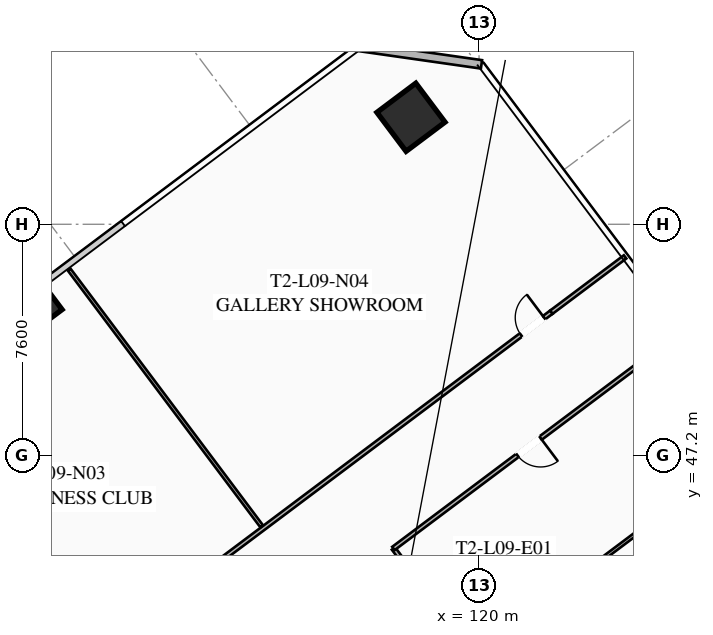
"""IFC4 building model, lengths in metres.
Left out: names, types, materials, properties, quantities, classifications, styles, units other than length and angle.
Written with IfcOpenShell. Run it as: python <this file> out.ifc"""

import sys

from ifc_helpers import new_model, si_unit, direction, frame, frame_2d, origin, origin_2d, place, context, subcontext, project, spatial, rectangle, hollow_rectangle, extrude, element, fill, save


model = new_model("IFC4")
c1 = context("Model", 3, precision=1e-05, world=origin(), true_north=direction((0.0, 1.0)))
c2 = subcontext(c1, "Body", "Model", "MODEL_VIEW")
j1 = project(units=[si_unit("LENGTHUNIT", "METRE"), si_unit("PLANEANGLEUNIT", "RADIAN")], contexts=[c1])
p1 = place(None, origin())
s1 = spatial("IfcSite", under=j1, at=p1, CompositionType="ELEMENT")
p2 = place(p1, origin())
s2 = spatial("IfcBuilding", under=s1, at=p2, CompositionType="ELEMENT")
p3 = place(p2, frame((0.0, 0.0, 38.8)))
s3 = spatial("IfcBuildingStorey", under=s2, at=p3, CompositionType="ELEMENT", Elevation=38.8)
p4 = place(p3, frame((117.76, 58.32, 0.0), z_axis=(0.0, 0.0, 1.0), x_axis=(0.799999996291, 0.600000004945, 0.0)))
e1 = element("IfcColumn", 1, at=p4, inside=s3, PredefinedType="COLUMN", context=c2, shape_type="SweptSolid", body=[
    extrude(hollow_rectangle(XDim=1.6, YDim=1.6, WallThickness=0.06, at=origin_2d()), origin(), (0.0, 0.0, 1.0), 3.35),
])
p5 = place(p3, frame((105.69, 52.08, 0.0), z_axis=(0.0, 0.0, 1.0), x_axis=(0.799999996291, 0.600000004945, 0.0)))
e2 = element("IfcColumn", 2, at=p5, inside=s3, PredefinedType="COLUMN", context=c2, shape_type="SweptSolid", body=[
    extrude(hollow_rectangle(XDim=0.85, YDim=0.85, WallThickness=0.035, at=origin_2d()), origin(), (0.0, 0.0, 1.0), 3.35),
])
p6 = place(p3, frame((116.02, 60.64, 0.0), z_axis=(0.0, 0.0, 1.0), x_axis=(0.989955445613, -0.14137968631, 0.0)))
e3 = element("IfcWall", 3, at=p6, inside=s3, PredefinedType="SOLIDWALL", context=c2, shape_type="SweptSolid", body=[
    extrude(rectangle(XDim=4.101, YDim=0.28, at=frame_2d((2.051, 0.0))), origin(), (0.0, 0.0, 1.0), 3.35),
])
p7 = place(p3, frame((119.824, 40.618, 0.0), z_axis=(0.0, 0.0, 1.0), x_axis=(-0.599982243973, 0.800013316712, 0.0)))
e4 = element("IfcWall", 4, at=p7, inside=s3, PredefinedType="PARTITIONING", context=c2, shape_type="SweptSolid", body=[
    extrude(rectangle(XDim=4.4, YDim=0.135, at=frame_2d((2.2, 0.0))), origin(), (0.0, 0.0, 1.0), 2.703),
])
p8 = place(p3, frame((98.316, 33.862, 0.0), z_axis=(0.0, 0.0, 1.0), x_axis=(0.800001947934, 0.599997402746, 0.0)))
e5 = element("IfcWall", 5, at=p8, inside=s3, PredefinedType="PARTITIONING", context=c2, shape_type="SweptSolid", body=[
    extrude(rectangle(XDim=30.08, YDim=0.135, at=frame_2d((15.04, 0.0))), origin(), (0.0, 0.0, 1.0), 2.703),
])
p9 = place(p8, frame((0.3, 0.0, 0.0)))
e6 = element("IfcOpeningElement", 6, at=p9, cuts=e5, PredefinedType="OPENING", context=c2, shape_type="SweptSolid", body=[
    extrude(rectangle(XDim=0.95, YDim=2.05, at=frame_2d((0.475, 1.025))), frame((0.0, 0.077, 0.0), z_axis=(0.0, -1.0, 0.0), x_axis=(1.0, 0.0, 0.0)), (0.0, 0.0, 1.0), 0.155),
])
p10 = place(p8, frame((7.172, 0.0, 0.0)))
e7 = element("IfcOpeningElement", 7, at=p10, cuts=e5, PredefinedType="OPENING", context=c2, shape_type="SweptSolid", body=[
    extrude(rectangle(XDim=0.95, YDim=2.05, at=frame_2d((0.475, 1.025))), frame((0.0, 0.077, 0.0), z_axis=(0.0, -1.0, 0.0), x_axis=(1.0, 0.0, 0.0)), (0.0, 0.0, 1.0), 0.155),
])
p11 = place(p8, frame((11.218, 0.0, 0.0)))
e8 = element("IfcOpeningElement", 8, at=p11, cuts=e5, PredefinedType="OPENING", context=c2, shape_type="SweptSolid", body=[
    extrude(rectangle(XDim=0.95, YDim=2.05, at=frame_2d((0.475, 1.025))), frame((0.0, 0.077, 0.0), z_axis=(0.0, -1.0, 0.0), x_axis=(1.0, 0.0, 0.0)), (0.0, 0.0, 1.0), 0.155),
])
p12 = place(p8, frame((28.83, 0.0, 0.0)))
e9 = element("IfcOpeningElement", 9, at=p12, cuts=e5, PredefinedType="OPENING", context=c2, shape_type="SweptSolid", body=[
    extrude(rectangle(XDim=0.95, YDim=2.05, at=frame_2d((0.475, 1.025))), frame((0.0, 0.077, 0.0), z_axis=(0.0, -1.0, 0.0), x_axis=(1.0, 0.0, 0.0)), (0.0, 0.0, 1.0), 0.155),
])
p13 = place(p3, frame((122.38, 51.91, 0.0), z_axis=(0.0, 0.0, 1.0), x_axis=(0.799990331366, 0.600012891296, 0.0)))
e10 = element("IfcWall", 10, at=p13, inside=s3, PredefinedType="PARTITIONING", context=c2, shape_type="SweptSolid", body=[
    extrude(rectangle(XDim=3.03, YDim=0.135, at=frame_2d((1.515, 0.0))), origin(), (0.0, 0.0, 1.0), 2.703),
])
p14 = place(p3, frame((112.852, 44.864, 0.0), z_axis=(0.0, 0.0, 1.0), x_axis=(-0.600007405188, 0.799994446056, 0.0)))
e11 = element("IfcWall", 11, at=p14, inside=s3, PredefinedType="PARTITIONING", context=c2, shape_type="SweptSolid", body=[
    extrude(rectangle(XDim=10.55, YDim=0.11, at=frame_2d((5.275, 0.0))), origin(), (0.0, 0.0, 1.0), 2.703),
])
p15 = place(p3, frame((126.664, 51.248, 0.0), z_axis=(0.0, 0.0, 1.0), x_axis=(-0.799995055373, -0.600006592779, 0.0)))
e12 = element("IfcWall", 12, at=p15, inside=s3, PredefinedType="PARTITIONING", context=c2, shape_type="SweptSolid", body=[
    extrude(rectangle(XDim=11.85, YDim=0.135, at=frame_2d((5.925, 0.0))), origin(), (0.0, 0.0, 1.0), 2.703),
])
p16 = place(p15, frame((5.8, 0.0, 0.0)))
e13 = element("IfcOpeningElement", 13, at=p16, cuts=e12, PredefinedType="OPENING", context=c2, shape_type="SweptSolid", body=[
    extrude(rectangle(XDim=0.95, YDim=2.05, at=frame_2d((0.475, 1.025))), frame((0.0, 0.077, 0.0), z_axis=(0.0, -1.0, 0.0), x_axis=(1.0, 0.0, 0.0)), (0.0, 0.0, 1.0), 0.155),
])
p17 = place(p3, frame((129.304, 47.728, 0.0), z_axis=(0.0, 0.0, 1.0), x_axis=(-0.8, -0.6, 0.0)))
e14 = element("IfcWall", 14, at=p17, inside=s3, PredefinedType="PARTITIONING", context=c2, shape_type="SweptSolid", body=[
    extrude(rectangle(XDim=10.0, YDim=0.11, at=frame_2d((5.0, 0.0))), origin(), (0.0, 0.0, 1.0), 2.703),
])
p18 = place(p12, origin())
e15 = element("IfcDoor", 15, at=p18, inside=s3, OperationType="SINGLE_SWING_RIGHT", PredefinedType="DOOR", context=c2, shape_type="SweptSolid", body=[
    extrude(rectangle(XDim=0.95, YDim=2.05, at=frame_2d((0.475, 1.025))), frame((0.0, 0.025, 0.0), z_axis=(0.0, -1.0, 0.0), x_axis=(1.0, 0.0, 0.0)), (0.0, 0.0, 1.0), 0.05),
])
fill(e9, e15)
p19 = place(p16, origin())
e16 = element("IfcDoor", 16, at=p19, inside=s3, OperationType="SINGLE_SWING_LEFT", PredefinedType="DOOR", context=c2, shape_type="SweptSolid", body=[
    extrude(rectangle(XDim=0.95, YDim=2.05, at=frame_2d((0.475, 1.025))), frame((0.0, 0.025, 0.0), z_axis=(0.0, -1.0, 0.0), x_axis=(1.0, 0.0, 0.0)), (0.0, 0.0, 1.0), 0.05),
])
fill(e13, e16)
save(model, sys.argv[1])
